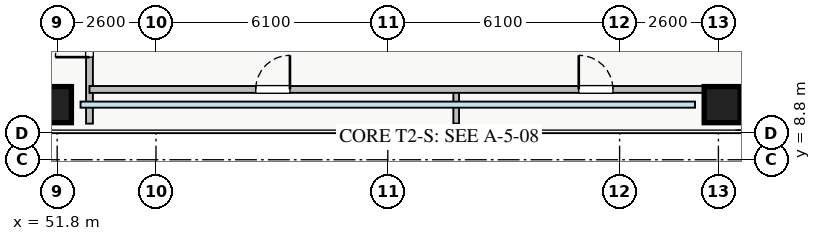
"""IFC4 building model, lengths in metres.
Left out: names, types, materials, properties, quantities, classifications, styles, units other than length and angle.
Written with IfcOpenShell. Run it as: python <this file> out.ifc"""

import sys

from ifc_helpers import new_model, si_unit, direction, frame, frame_2d, origin, origin_2d, place, context, subcontext, project, spatial, rectangle, extrude, source, transform, mapped, element, fill, save


model = new_model("IFC4")
c1 = context("Model", 3, precision=1e-05, world=origin(), true_north=direction((0.0, 1.0)))
c2 = subcontext(c1, "Body", "Model", "MODEL_VIEW")
j1 = project(units=[si_unit("LENGTHUNIT", "METRE"), si_unit("PLANEANGLEUNIT", "RADIAN")], contexts=[c1])
p1 = place(None, origin())
s1 = spatial("IfcSite", under=j1, at=p1, CompositionType="ELEMENT")
p2 = place(p1, origin())
s2 = spatial("IfcBuilding", under=s1, at=p2, CompositionType="ELEMENT")
p3 = place(p2, frame((0.0, 0.0, 56.75)))
s3 = spatial("IfcBuildingStorey", under=s2, at=p3, CompositionType="ELEMENT", Elevation=56.75)
m1 = source(origin(), c2, "Body", "SweptSolid", [
    extrude(rectangle(XDim=0.95, YDim=0.95, at=origin_2d()), origin(), (0.0, 0.0, 1.0), 3.25),
])
for number, where, z_axis, x_axis in (
    (1, (51.7, 10.25, 0.0), (0.0, 0.0, 1.0), (1.0, 0.0, 0.0)),
    (2, (69.3, 10.25, 0.0), (0.0, 0.0, 1.0), (1.0, 0.0, 0.0)),
):
    element("IfcColumn", number, at=place(p3, frame(where, z_axis=z_axis, x_axis=x_axis)), inside=s3, PredefinedType="COLUMN", context=c2, shape_type="MappedRepresentation", body=[
        mapped(m1, transform((0.0, 0.0, 0.0), x_axis=(1.0, 0.0, 0.0), y_axis=(0.0, 1.0, 0.0), z_axis=(0.0, 0.0, 1.0), scale=1.0)),
    ])
p4 = place(p3, frame((52.65, 9.75, 0.0), z_axis=(0.0, 0.0, 1.0), x_axis=(0.0, 1.0, 0.0)))
e3 = element("IfcWall", 3, at=p4, inside=s3, PredefinedType="PARTITIONING", context=c2, shape_type="SweptSolid", body=[
    extrude(rectangle(XDim=26.5, YDim=0.18, at=frame_2d((13.25, 0.0))), origin(), (0.0, 0.0, 1.0), 3.07),
])
p5 = place(p4, frame((23.85, 0.0, 0.0)))
e4 = element("IfcOpeningElement", 4, at=p5, cuts=e3, PredefinedType="OPENING", context=c2, shape_type="SweptSolid", body=[
    extrude(rectangle(XDim=0.9, YDim=2.05, at=frame_2d((0.45, 1.025))), frame((0.0, 0.1, 0.0), z_axis=(0.0, -1.0, 0.0), x_axis=(1.0, 0.0, 0.0)), (0.0, 0.0, 1.0), 0.2),
])
p6 = place(p4, frame((1.75, 0.0, 0.0)))
e5 = element("IfcOpeningElement", 5, at=p6, cuts=e3, PredefinedType="OPENING", context=c2, shape_type="SweptSolid", body=[
    extrude(rectangle(XDim=0.9, YDim=2.05, at=frame_2d((0.45, 1.025))), frame((0.0, 0.1, 0.0), z_axis=(0.0, -1.0, 0.0), x_axis=(1.0, 0.0, 0.0)), (0.0, 0.0, 1.0), 0.2),
])
p7 = place(p4, frame((5.145, 0.0, 0.0)))
e6 = element("IfcOpeningElement", 6, at=p7, cuts=e3, PredefinedType="OPENING", context=c2, shape_type="SweptSolid", body=[
    extrude(rectangle(XDim=1.0, YDim=2.05, at=frame_2d((0.5, 1.025))), frame((0.0, 0.1, 0.0), z_axis=(0.0, -1.0, 0.0), x_axis=(1.0, 0.0, 0.0)), (0.0, 0.0, 1.0), 0.2),
])
p8 = place(p4, frame((14.39, 0.0, 0.0)))
e7 = element("IfcOpeningElement", 7, at=p8, cuts=e3, PredefinedType="OPENING", context=c2, shape_type="SweptSolid", body=[
    extrude(rectangle(XDim=1.0, YDim=2.05, at=frame_2d((0.5, 1.025))), frame((0.0, 0.1, 0.0), z_axis=(0.0, -1.0, 0.0), x_axis=(1.0, 0.0, 0.0)), (0.0, 0.0, 1.0), 0.2),
])
for number, where, z_axis, x_axis in (
    (8, (62.3, 9.75, 0.0), (0.0, 0.0, 1.0), (0.0, 1.0, 0.0)),
    (9, (69.65, 9.75, 0.0), (0.0, 0.0, 1.0), (0.0, 1.0, 0.0)),
):
    element("IfcWall", number, at=place(p3, frame(where, z_axis=z_axis, x_axis=x_axis)), inside=s3, PredefinedType="PARTITIONING", context=c2, shape_type="SweptSolid", body=[
        extrude(rectangle(XDim=0.9, YDim=0.15, at=frame_2d((0.45, 0.0))), origin(), (0.0, 0.0, 1.0), 3.07),
    ])
p9 = place(p3, frame((52.65, 10.65, 0.0), z_axis=(0.0, 0.0, 1.0), x_axis=(1.0, 0.0, 0.0)))
e10 = element("IfcWall", 10, at=p9, inside=s3, PredefinedType="PARTITIONING", context=c2, shape_type="SweptSolid", body=[
    extrude(rectangle(XDim=17.0, YDim=0.18, at=frame_2d((8.5, 0.0))), origin(), (0.0, 0.0, 1.0), 3.07),
])
p10 = place(p9, frame((4.375, 0.0, 0.0)))
e11 = element("IfcOpeningElement", 11, at=p10, cuts=e10, PredefinedType="OPENING", context=c2, shape_type="SweptSolid", body=[
    extrude(rectangle(XDim=0.9, YDim=2.05, at=frame_2d((0.45, 1.025))), frame((0.0, 0.1, 0.0), z_axis=(0.0, -1.0, 0.0), x_axis=(1.0, 0.0, 0.0)), (0.0, 0.0, 1.0), 0.2),
])
p11 = place(p9, frame((12.875, 0.0, 0.0)))
e12 = element("IfcOpeningElement", 12, at=p11, cuts=e10, PredefinedType="OPENING", context=c2, shape_type="SweptSolid", body=[
    extrude(rectangle(XDim=0.9, YDim=2.05, at=frame_2d((0.45, 1.025))), frame((0.0, 0.1, 0.0), z_axis=(0.0, -1.0, 0.0), x_axis=(1.0, 0.0, 0.0)), (0.0, 0.0, 1.0), 0.2),
])
m2 = source(origin(), c2, "Body", "SweptSolid", [
    extrude(rectangle(XDim=0.9, YDim=2.05, at=frame_2d((0.45, 1.025))), frame((0.0, 0.025, 0.0), z_axis=(0.0, -1.0, 0.0), x_axis=(1.0, 0.0, 0.0)), (0.0, 0.0, 1.0), 0.05),
])
p12 = place(p6, origin())
e13 = element("IfcDoor", 13, at=p12, inside=s3, OperationType="SINGLE_SWING_LEFT", PredefinedType="DOOR", context=c2, shape_type="MappedRepresentation", body=[
    mapped(m2, transform((0.0, 0.0, 0.0), x_axis=(1.0, 0.0, 0.0), y_axis=(0.0, 1.0, 0.0), z_axis=(0.0, 0.0, 1.0), scale=1.0)),
])
fill(e5, e13)
p13 = place(p10, origin())
e14 = element("IfcDoor", 14, at=p13, inside=s3, OperationType="SINGLE_SWING_RIGHT", PredefinedType="DOOR", context=c2, shape_type="MappedRepresentation", body=[
    mapped(m2, transform((0.0, 0.0, 0.0), x_axis=(1.0, 0.0, 0.0), y_axis=(0.0, 1.0, 0.0), z_axis=(0.0, 0.0, 1.0), scale=1.0)),
])
fill(e11, e14)
p14 = place(p11, origin())
e15 = element("IfcDoor", 15, at=p14, inside=s3, OperationType="SINGLE_SWING_LEFT", PredefinedType="DOOR", context=c2, shape_type="MappedRepresentation", body=[
    mapped(m2, transform((0.0, 0.0, 0.0), x_axis=(1.0, 0.0, 0.0), y_axis=(0.0, 1.0, 0.0), z_axis=(0.0, 0.0, 1.0), scale=1.0)),
])
fill(e12, e15)
save(model, sys.argv[1])
